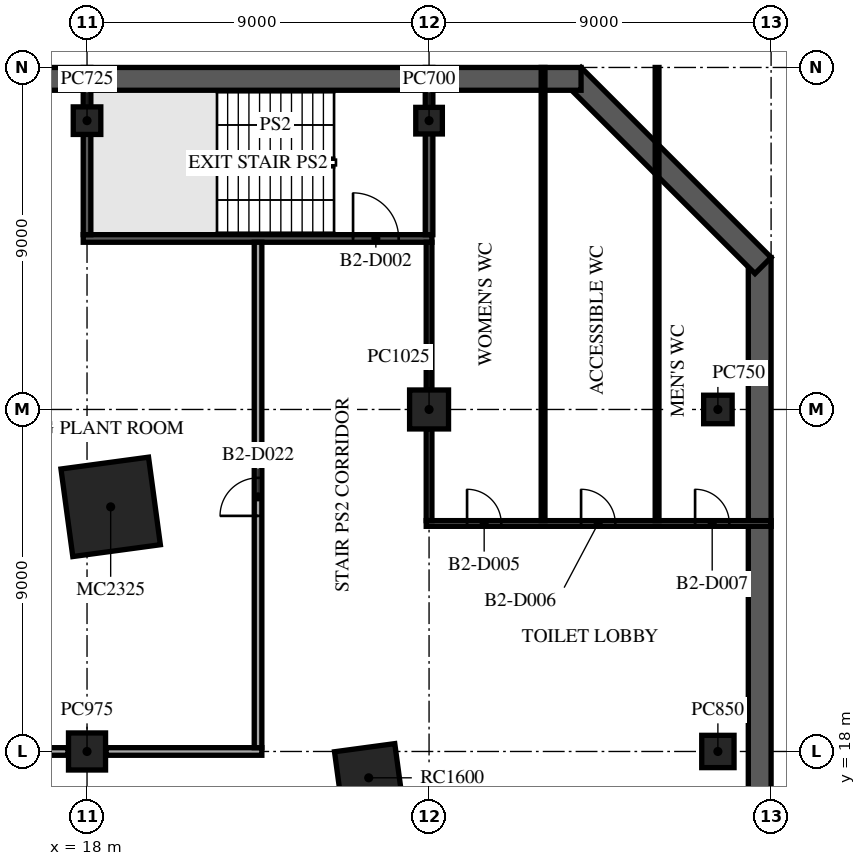
"""IFC4 building model, lengths in metres.
Left out: names, types, materials, properties, quantities, classifications, styles, units other than length and angle.
Written with IfcOpenShell. Run it as: python <this file> out.ifc"""

import sys

from ifc_helpers import new_model, si_unit, direction, frame, frame_2d, origin, origin_2d, place, context, subcontext, project, spatial, rectangle, extrude, element, fill, save


model = new_model("IFC4")
c1 = context("Model", 3, precision=1e-05, world=origin(), true_north=direction((0.0, 1.0)))
c2 = subcontext(c1, "Body", "Model", "MODEL_VIEW")
j1 = project(units=[si_unit("LENGTHUNIT", "METRE"), si_unit("PLANEANGLEUNIT", "RADIAN")], contexts=[c1])
p1 = place(None, origin())
s1 = spatial("IfcSite", under=j1, at=p1, CompositionType="ELEMENT")
p2 = place(p1, origin())
s2 = spatial("IfcBuilding", under=s1, at=p2, CompositionType="ELEMENT")
p3 = place(p2, frame((0.0, 0.0, -9.0)))
s3 = spatial("IfcBuildingStorey", under=s2, at=p3, CompositionType="ELEMENT", Elevation=-9.0)
p4 = place(p3, frame((35.7, -31.0, -0.3), z_axis=(0.0, 0.0, 1.0), x_axis=(0.0, 1.0, 0.0)))
e1 = element("IfcWall", 1, at=p4, inside=s3, PredefinedType="SOLIDWALL", context=c2, shape_type="SweptSolid", body=[
    extrude(rectangle(XDim=62.0, YDim=0.6, at=frame_2d((31.0, 0.0))), origin(), (0.0, 0.0, 1.0), 4.5),
])
p5 = place(p3, frame((35.788, 30.788, -0.3), z_axis=(0.0, 0.0, 1.0), x_axis=(-0.707106781187, 0.707106781187, 0.0)))
e2 = element("IfcWall", 2, at=p5, inside=s3, PredefinedType="SOLIDWALL", context=c2, shape_type="SweptSolid", body=[
    extrude(rectangle(XDim=7.071, YDim=0.6, at=frame_2d((3.536, 0.0))), origin(), (0.0, 0.0, 1.0), 4.5),
])
p6 = place(p3, frame((31.0, 35.7, -0.3), z_axis=(0.0, 0.0, 1.0), x_axis=(-1.0, 0.0, 0.0)))
e3 = element("IfcWall", 3, at=p6, inside=s3, PredefinedType="SOLIDWALL", context=c2, shape_type="SweptSolid", body=[
    extrude(rectangle(XDim=62.0, YDim=0.6, at=frame_2d((31.0, 0.0))), origin(), (0.0, 0.0, 1.0), 4.5),
])
p7 = place(p3, frame((18.0, 18.0, -0.3), z_axis=(0.0, 0.0, 1.0), x_axis=(1.0, 0.0, 0.0)))
e4 = element("IfcColumn", 4, at=p7, inside=s3, PredefinedType="COLUMN", context=c2, shape_type="SweptSolid", body=[
    extrude(rectangle(XDim=0.975, YDim=0.975, at=origin_2d()), origin(), (0.0, 0.0, 1.0), 4.8),
])
p8 = place(p3, frame((18.0, 34.6, -0.3), z_axis=(0.0, 0.0, 1.0), x_axis=(1.0, 0.0, 0.0)))
e5 = element("IfcColumn", 5, at=p8, inside=s3, PredefinedType="COLUMN", context=c2, shape_type="SweptSolid", body=[
    extrude(rectangle(XDim=0.725, YDim=0.725, at=origin_2d()), origin(), (0.0, 0.0, 1.0), 4.8),
])
p9 = place(p3, frame((27.0, 27.0, -0.3), z_axis=(0.0, 0.0, 1.0), x_axis=(1.0, 0.0, 0.0)))
e6 = element("IfcColumn", 6, at=p9, inside=s3, PredefinedType="COLUMN", context=c2, shape_type="SweptSolid", body=[
    extrude(rectangle(XDim=1.025, YDim=1.025, at=origin_2d()), origin(), (0.0, 0.0, 1.0), 4.8),
])
p10 = place(p3, frame((27.0, 34.6, -0.3), z_axis=(0.0, 0.0, 1.0), x_axis=(1.0, 0.0, 0.0)))
e7 = element("IfcColumn", 7, at=p10, inside=s3, PredefinedType="COLUMN", context=c2, shape_type="SweptSolid", body=[
    extrude(rectangle(XDim=0.7, YDim=0.7, at=origin_2d()), origin(), (0.0, 0.0, 1.0), 4.8),
])
p11 = place(p3, frame((34.6, 18.0, -0.3), z_axis=(0.0, 0.0, 1.0), x_axis=(1.0, 0.0, 0.0)))
e8 = element("IfcColumn", 8, at=p11, inside=s3, PredefinedType="COLUMN", context=c2, shape_type="SweptSolid", body=[
    extrude(rectangle(XDim=0.85, YDim=0.85, at=origin_2d()), origin(), (0.0, 0.0, 1.0), 4.8),
])
p12 = place(p3, frame((34.6, 27.0, -0.3), z_axis=(0.0, 0.0, 1.0), x_axis=(1.0, 0.0, 0.0)))
e9 = element("IfcColumn", 9, at=p12, inside=s3, PredefinedType="COLUMN", context=c2, shape_type="SweptSolid", body=[
    extrude(rectangle(XDim=0.75, YDim=0.75, at=origin_2d()), origin(), (0.0, 0.0, 1.0), 4.8),
])
p13 = place(p3, frame((18.622, 24.437, -0.3), z_axis=(0.0, 0.0, 1.0), x_axis=(0.991001197216, 0.133853005627, 0.0)))
e10 = element("IfcColumn", 10, at=p13, inside=s3, PredefinedType="COLUMN", context=c2, shape_type="SweptSolid", body=[
    extrude(rectangle(XDim=2.325, YDim=2.325, at=origin_2d()), origin(), (0.0, 0.0, 1.0), 4.8),
])
p14 = place(p3, frame((25.412, 17.307, -0.3), z_axis=(0.0, 0.0, 1.0), x_axis=(0.991001197216, 0.133853005627, 0.0)))
e11 = element("IfcColumn", 11, at=p14, inside=s3, PredefinedType="COLUMN", context=c2, shape_type="SweptSolid", body=[
    extrude(rectangle(XDim=1.6, YDim=1.6, at=origin_2d()), origin(), (0.0, 0.0, 1.0), 4.8),
])
p15 = place(p3, frame((13.6, 18.0, 0.0), z_axis=(0.0, 0.0, 1.0), x_axis=(1.0, 0.0, 0.0)))
e12 = element("IfcWall", 12, at=p15, inside=s3, PredefinedType="PARTITIONING", context=c2, shape_type="SweptSolid", body=[
    extrude(rectangle(XDim=3.9, YDim=0.2, at=frame_2d((1.95, 0.0))), origin(), (0.0, 0.0, 1.0), 4.2),
])
p16 = place(p3, frame((18.5, 18.0, 0.0), z_axis=(0.0, 0.0, 1.0), x_axis=(1.0, 0.0, 0.0)))
e13 = element("IfcWall", 13, at=p16, inside=s3, PredefinedType="PARTITIONING", context=c2, shape_type="SweptSolid", body=[
    extrude(rectangle(XDim=4.1, YDim=0.2, at=frame_2d((2.05, 0.0))), origin(), (0.0, 0.0, 1.0), 4.2),
])
p17 = place(p3, frame((26.925, 24.0, 0.0), z_axis=(0.0, 0.0, 1.0), x_axis=(1.0, 0.0, 0.0)))
e14 = element("IfcWall", 14, at=p17, inside=s3, PredefinedType="PARTITIONING", context=c2, shape_type="SweptSolid", body=[
    extrude(rectangle(XDim=9.075, YDim=0.15, at=frame_2d((4.538, 0.0))), origin(), (0.0, 0.0, 1.0), 4.2),
])
p18 = place(p17, frame((1.075, 0.0, 0.0)))
e15 = element("IfcOpeningElement", 15, at=p18, cuts=e14, PredefinedType="OPENING", context=c2, shape_type="SweptSolid", body=[
    extrude(rectangle(XDim=0.9, YDim=2.1, at=frame_2d((0.45, 1.05))), frame((0.0, 0.085, 0.0), z_axis=(0.0, -1.0, 0.0), x_axis=(1.0, 0.0, 0.0)), (0.0, 0.0, 1.0), 0.17),
])
p19 = place(p17, frame((4.075, 0.0, 0.0)))
e16 = element("IfcOpeningElement", 16, at=p19, cuts=e14, PredefinedType="OPENING", context=c2, shape_type="SweptSolid", body=[
    extrude(rectangle(XDim=0.9, YDim=2.1, at=frame_2d((0.45, 1.05))), frame((0.0, 0.085, 0.0), z_axis=(0.0, -1.0, 0.0), x_axis=(1.0, 0.0, 0.0)), (0.0, 0.0, 1.0), 0.17),
])
p20 = place(p17, frame((7.075, 0.0, 0.0)))
e17 = element("IfcOpeningElement", 17, at=p20, cuts=e14, PredefinedType="OPENING", context=c2, shape_type="SweptSolid", body=[
    extrude(rectangle(XDim=0.9, YDim=2.1, at=frame_2d((0.45, 1.05))), frame((0.0, 0.085, 0.0), z_axis=(0.0, -1.0, 0.0), x_axis=(1.0, 0.0, 0.0)), (0.0, 0.0, 1.0), 0.17),
])
p21 = place(p3, frame((17.9, 31.5, 0.0), z_axis=(0.0, 0.0, 1.0), x_axis=(1.0, 0.0, 0.0)))
e18 = element("IfcWall", 18, at=p21, inside=s3, PredefinedType="PARTITIONING", context=c2, shape_type="SweptSolid", body=[
    extrude(rectangle(XDim=9.175, YDim=0.2, at=frame_2d((4.587, 0.0))), origin(), (0.0, 0.0, 1.0), 4.2),
])
p22 = place(p21, frame((7.1, 0.0, 0.0)))
e19 = element("IfcOpeningElement", 19, at=p22, cuts=e18, PredefinedType="OPENING", context=c2, shape_type="SweptSolid", body=[
    extrude(rectangle(XDim=1.2, YDim=2.1, at=frame_2d((0.6, 1.05))), frame((0.0, 0.11, 0.0), z_axis=(0.0, -1.0, 0.0), x_axis=(1.0, 0.0, 0.0)), (0.0, 0.0, 1.0), 0.22),
])
p23 = place(p3, frame((18.0, 31.6, 0.0), z_axis=(0.0, 0.0, 1.0), x_axis=(0.0, 1.0, 0.0)))
e20 = element("IfcWall", 20, at=p23, inside=s3, PredefinedType="PARTITIONING", context=c2, shape_type="SweptSolid", body=[
    extrude(rectangle(XDim=4.4, YDim=0.2, at=frame_2d((2.2, 0.0))), origin(), (0.0, 0.0, 1.0), 4.2),
])
p24 = place(p3, frame((22.5, 18.1, 0.0), z_axis=(0.0, 0.0, 1.0), x_axis=(0.0, 1.0, 0.0)))
e21 = element("IfcWall", 21, at=p24, inside=s3, PredefinedType="PARTITIONING", context=c2, shape_type="SweptSolid", body=[
    extrude(rectangle(XDim=13.3, YDim=0.2, at=frame_2d((6.65, 0.0))), origin(), (0.0, 0.0, 1.0), 4.2),
])
p25 = place(p24, frame((6.1, 0.0, 0.0)))
e22 = element("IfcOpeningElement", 22, at=p25, cuts=e21, PredefinedType="OPENING", context=c2, shape_type="SweptSolid", body=[
    extrude(rectangle(XDim=1.0, YDim=2.1, at=frame_2d((0.5, 1.05))), frame((0.0, 0.11, 0.0), z_axis=(0.0, -1.0, 0.0), x_axis=(1.0, 0.0, 0.0)), (0.0, 0.0, 1.0), 0.22),
])
p26 = place(p3, frame((27.0, 24.075, 0.0), z_axis=(0.0, 0.0, 1.0), x_axis=(0.0, 1.0, 0.0)))
e23 = element("IfcWall", 23, at=p26, inside=s3, PredefinedType="PARTITIONING", context=c2, shape_type="SweptSolid", body=[
    extrude(rectangle(XDim=2.425, YDim=0.15, at=frame_2d((1.212, 0.0))), origin(), (0.0, 0.0, 1.0), 4.2),
])
p27 = place(p3, frame((27.0, 27.5, 0.0), z_axis=(0.0, 0.0, 1.0), x_axis=(0.0, 1.0, 0.0)))
e24 = element("IfcWall", 24, at=p27, inside=s3, PredefinedType="PARTITIONING", context=c2, shape_type="SweptSolid", body=[
    extrude(rectangle(XDim=3.9, YDim=0.15, at=frame_2d((1.95, 0.0))), origin(), (0.0, 0.0, 1.0), 4.2),
])
p28 = place(p3, frame((27.0, 31.6, 0.0), z_axis=(0.0, 0.0, 1.0), x_axis=(0.0, 1.0, 0.0)))
e25 = element("IfcWall", 25, at=p28, inside=s3, PredefinedType="PARTITIONING", context=c2, shape_type="SweptSolid", body=[
    extrude(rectangle(XDim=4.4, YDim=0.2, at=frame_2d((2.2, 0.0))), origin(), (0.0, 0.0, 1.0), 4.2),
])
for number, where, z_axis, x_axis in (
    (26, (30.0, 24.075, 0.0), (0.0, 0.0, 1.0), (0.0, 1.0, 0.0)),
    (27, (33.0, 24.075, 0.0), (0.0, 0.0, 1.0), (0.0, 1.0, 0.0)),
):
    element("IfcWall", number, at=place(p3, frame(where, z_axis=z_axis, x_axis=x_axis)), inside=s3, PredefinedType="PARTITIONING", context=c2, shape_type="SweptSolid", body=[
        extrude(rectangle(XDim=11.925, YDim=0.1, at=frame_2d((5.962, 0.0))), origin(), (0.0, 0.0, 1.0), 4.2),
    ])
p29 = place(p22, origin())
e28 = element("IfcDoor", 28, at=p29, inside=s3, OperationType="SINGLE_SWING_RIGHT", PredefinedType="DOOR", context=c2, shape_type="SweptSolid", body=[
    extrude(rectangle(XDim=1.2, YDim=2.1, at=frame_2d((0.6, 1.05))), frame((0.0, 0.025, 0.0), z_axis=(0.0, -1.0, 0.0), x_axis=(1.0, 0.0, 0.0)), (0.0, 0.0, 1.0), 0.05),
])
fill(e19, e28)
p30 = place(p18, origin())
e29 = element("IfcDoor", 29, at=p30, inside=s3, OperationType="SINGLE_SWING_LEFT", PredefinedType="DOOR", context=c2, shape_type="SweptSolid", body=[
    extrude(rectangle(XDim=0.9, YDim=2.1, at=frame_2d((0.45, 1.05))), frame((0.0, 0.025, 0.0), z_axis=(0.0, -1.0, 0.0), x_axis=(1.0, 0.0, 0.0)), (0.0, 0.0, 1.0), 0.05),
])
fill(e15, e29)
p31 = place(p19, origin())
e30 = element("IfcDoor", 30, at=p31, inside=s3, OperationType="SINGLE_SWING_RIGHT", PredefinedType="DOOR", context=c2, shape_type="SweptSolid", body=[
    extrude(rectangle(XDim=0.9, YDim=2.1, at=frame_2d((0.45, 1.05))), frame((0.0, 0.025, 0.0), z_axis=(0.0, -1.0, 0.0), x_axis=(1.0, 0.0, 0.0)), (0.0, 0.0, 1.0), 0.05),
])
fill(e16, e30)
p32 = place(p20, origin())
e31 = element("IfcDoor", 31, at=p32, inside=s3, OperationType="SINGLE_SWING_LEFT", PredefinedType="DOOR", context=c2, shape_type="SweptSolid", body=[
    extrude(rectangle(XDim=0.9, YDim=2.1, at=frame_2d((0.45, 1.05))), frame((0.0, 0.025, 0.0), z_axis=(0.0, -1.0, 0.0), x_axis=(1.0, 0.0, 0.0)), (0.0, 0.0, 1.0), 0.05),
])
fill(e17, e31)
p33 = place(p25, origin())
e32 = element("IfcDoor", 32, at=p33, inside=s3, OperationType="SINGLE_SWING_RIGHT", PredefinedType="DOOR", context=c2, shape_type="SweptSolid", body=[
    extrude(rectangle(XDim=1.0, YDim=2.1, at=frame_2d((0.5, 1.05))), frame((0.0, 0.025, 0.0), z_axis=(0.0, -1.0, 0.0), x_axis=(1.0, 0.0, 0.0)), (0.0, 0.0, 1.0), 0.05),
])
fill(e22, e32)
save(model, sys.argv[1])
